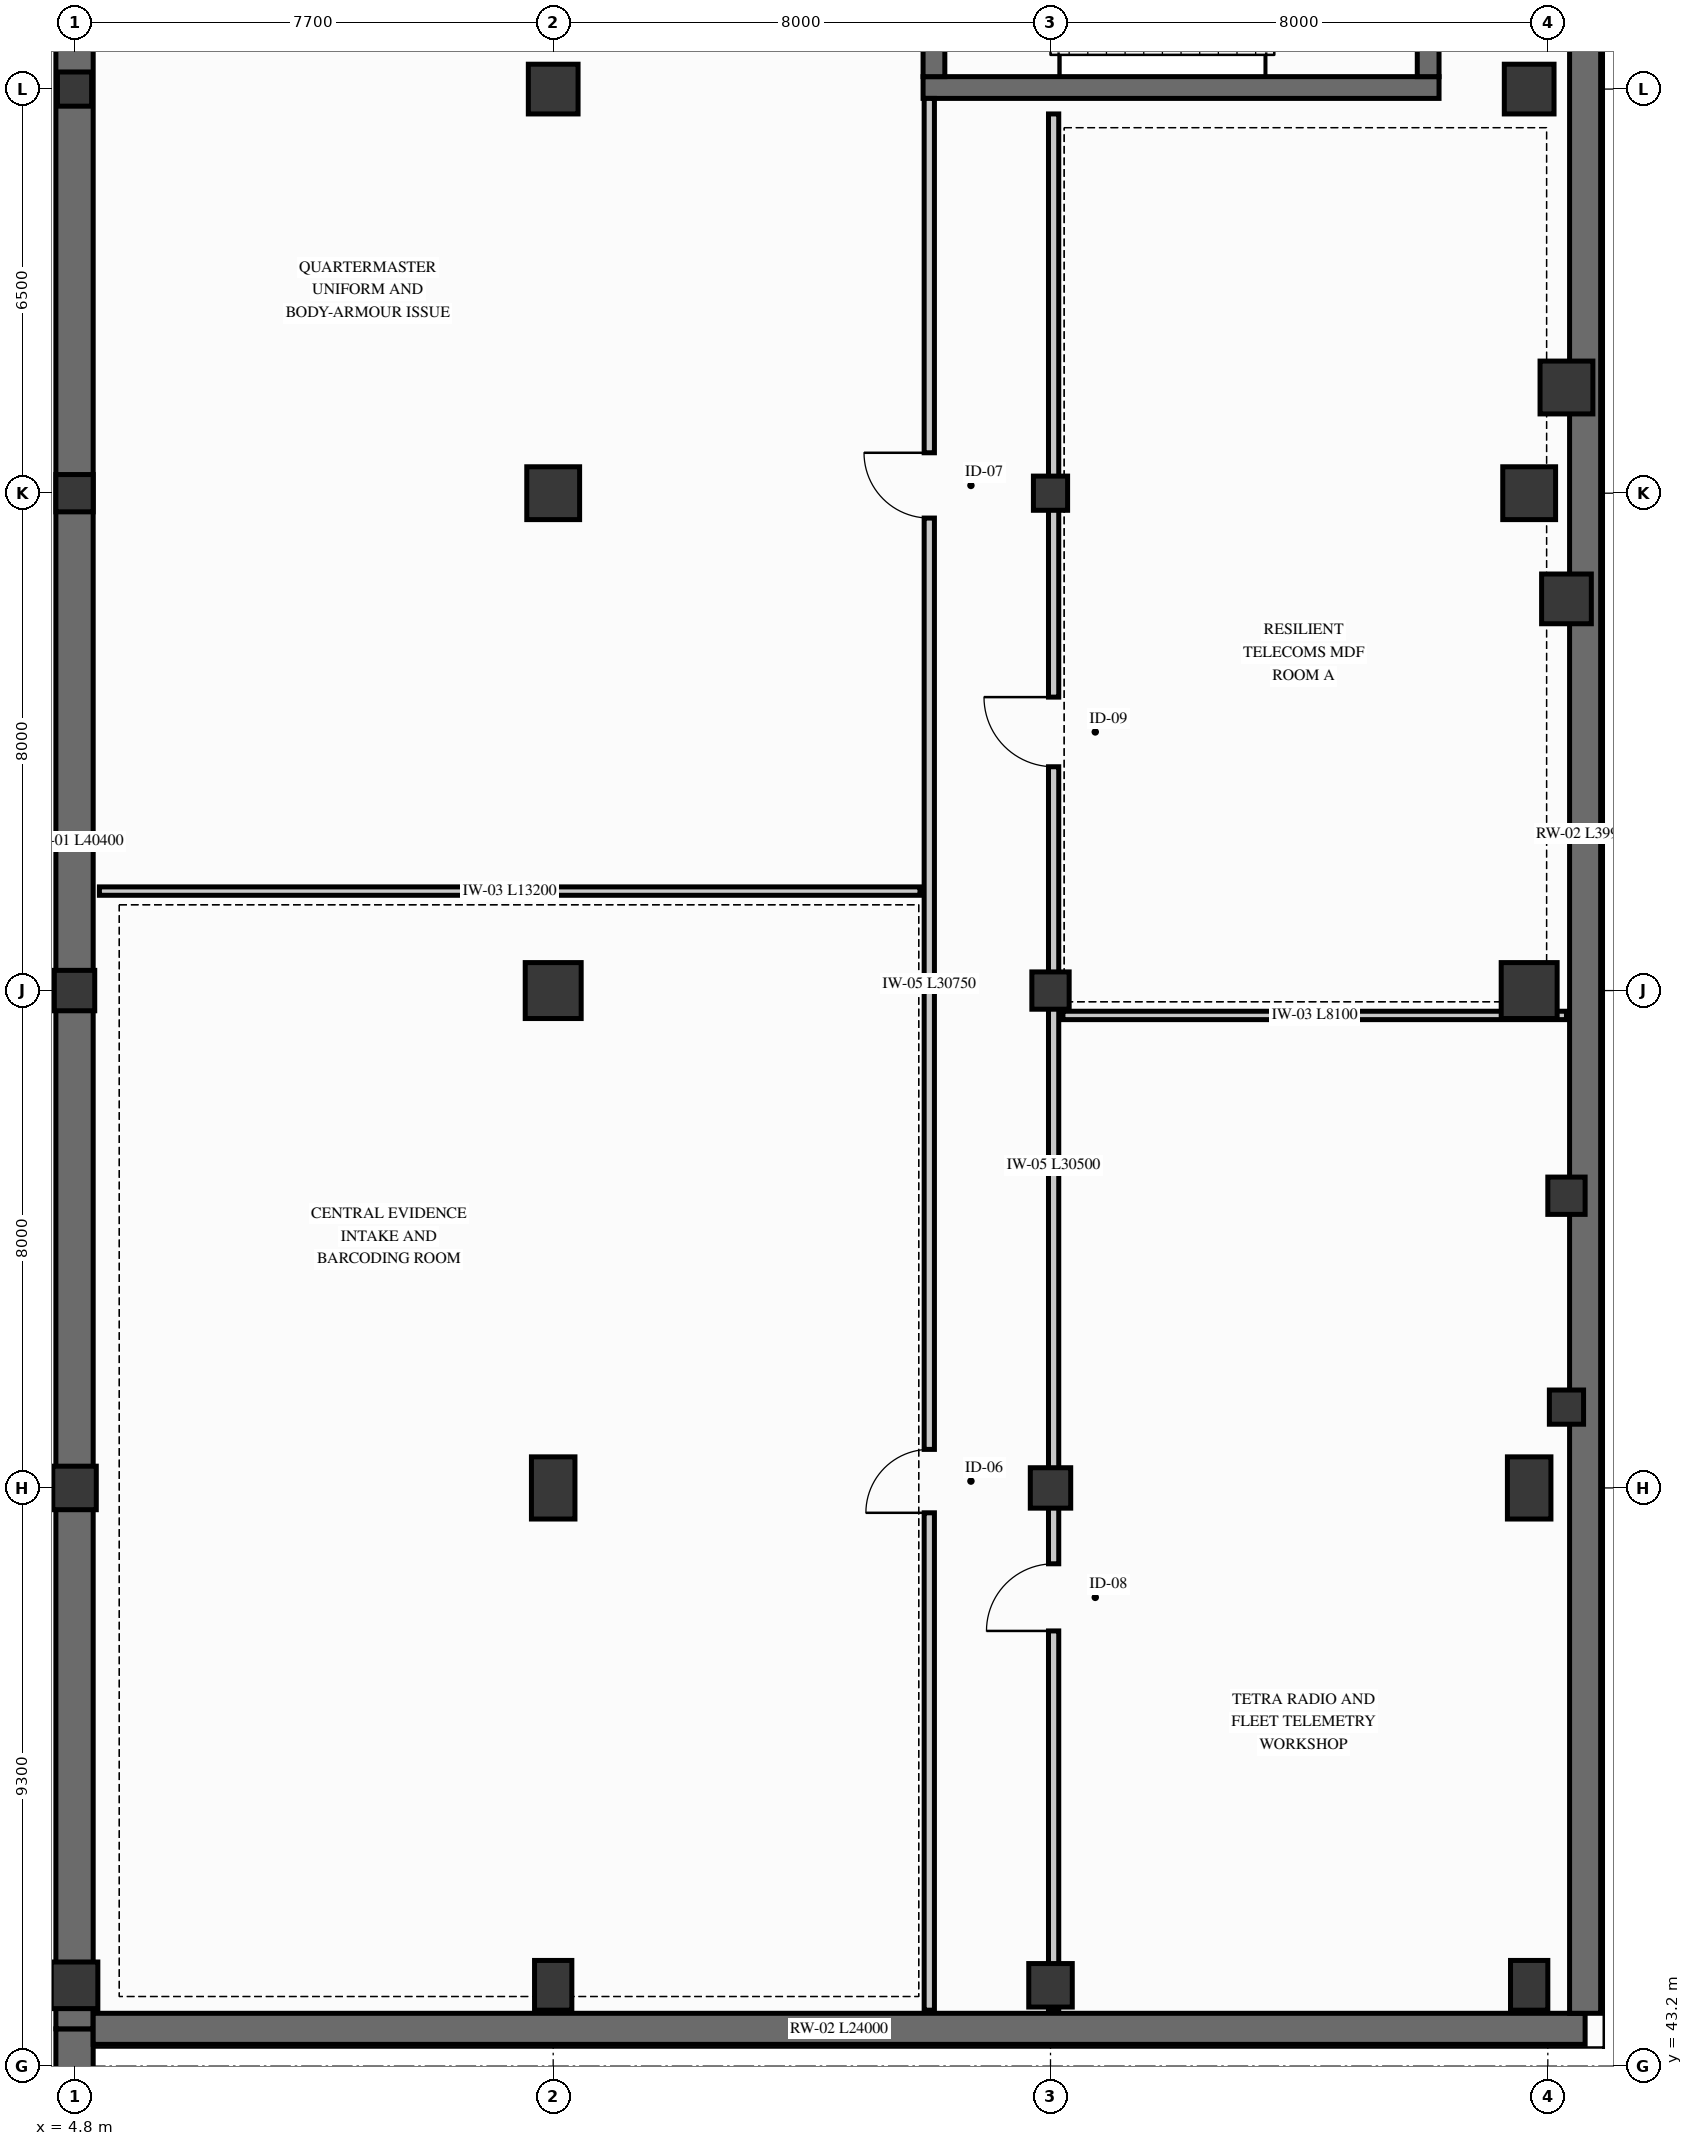
"""IFC4 building model, lengths in metres.
Left out: names, types, materials, properties, quantities, classifications, styles, units other than length and angle.
Written with IfcOpenShell. Run it as: python <this file> out.ifc"""

import sys

from ifc_helpers import new_model, si_unit, direction, frame, frame_2d, origin, origin_2d, place, context, subcontext, project, spatial, rectangle, extrude, element, fill, save


model = new_model("IFC4")
c1 = context("Model", 3, precision=1e-05, world=origin(), true_north=direction((0.0, 1.0)))
c2 = subcontext(c1, "Body", "Model", "MODEL_VIEW")
j1 = project(units=[si_unit("LENGTHUNIT", "METRE"), si_unit("PLANEANGLEUNIT", "RADIAN")], contexts=[c1])
p1 = place(None, origin())
s1 = spatial("IfcSite", under=j1, at=p1, CompositionType="ELEMENT")
p2 = place(p1, origin())
s2 = spatial("IfcBuilding", under=s1, at=p2, CompositionType="ELEMENT")
p3 = place(p2, frame((0.0, 0.0, -4.2)))
s3 = spatial("IfcBuildingStorey", under=s2, at=p3, CompositionType="ELEMENT", Elevation=-4.2)
p4 = place(p3, frame((4.8, 5.1, 0.0), z_axis=(0.0, 0.0, 1.0), x_axis=(0.0, 1.0, 0.0)))
e1 = element("IfcWall", 1, at=p4, inside=s3, PredefinedType="USERDEFINED", context=c2, shape_type="SweptSolid", body=[
    extrude(rectangle(XDim=38.7, YDim=0.6, at=frame_2d((19.35, 0.0))), origin(), (0.0, 0.0, 1.0), 3.94),
])
p5 = place(p3, frame((4.8, 43.8, 0.0), z_axis=(0.0, 0.0, 1.0), x_axis=(0.0, 1.0, 0.0)))
e2 = element("IfcWall", 2, at=p5, inside=s3, PredefinedType="USERDEFINED", context=c2, shape_type="SweptSolid", body=[
    extrude(rectangle(XDim=40.4, YDim=0.6, at=frame_2d((20.2, 0.0))), origin(), (0.0, 0.0, 1.0), 3.94),
])
p6 = place(p3, frame((5.1, 43.8, 0.0), z_axis=(0.0, 0.0, 1.0), x_axis=(1.0, 0.0, 0.0)))
e3 = element("IfcWall", 3, at=p6, inside=s3, PredefinedType="USERDEFINED", context=c2, shape_type="SweptSolid", body=[
    extrude(rectangle(XDim=24.0, YDim=0.5, at=frame_2d((12.0, 0.0))), origin(), (0.0, 0.0, 1.0), 3.94),
])
p7 = place(p3, frame((29.1, 44.05, 0.0), z_axis=(0.0, 0.0, 1.0), x_axis=(0.0, 1.0, 0.0)))
e4 = element("IfcWall", 4, at=p7, inside=s3, PredefinedType="USERDEFINED", context=c2, shape_type="SweptSolid", body=[
    extrude(rectangle(XDim=39.9, YDim=0.5, at=frame_2d((19.95, 0.0))), origin(), (0.0, 0.0, 1.0), 3.94),
])
p8 = place(p3, frame((18.45, 75.025, 0.0), z_axis=(0.0, 0.0, 1.0), x_axis=(1.0, 0.0, 0.0)))
e5 = element("IfcWall", 5, at=p8, inside=s3, PredefinedType="SHEAR", context=c2, shape_type="SweptSolid", body=[
    extrude(rectangle(XDim=8.3, YDim=0.35, at=frame_2d((4.15, 0.0))), origin(), (0.0, 0.0, 1.0), 3.9),
])
p9 = place(p3, frame((18.625, 75.2, 0.0), z_axis=(0.0, 0.0, 1.0), x_axis=(0.0, 1.0, 0.0)))
e6 = element("IfcWall", 6, at=p9, inside=s3, PredefinedType="SHEAR", context=c2, shape_type="SweptSolid", body=[
    extrude(rectangle(XDim=6.8, YDim=0.35, at=frame_2d((3.4, 0.0))), origin(), (0.0, 0.0, 1.0), 3.9),
])
p10 = place(p9, frame((2.6, 0.0, 0.0)))
e7 = element("IfcOpeningElement", 7, at=p10, cuts=e6, PredefinedType="OPENING", context=c2, shape_type="SweptSolid", body=[
    extrude(rectangle(XDim=1.25, YDim=2.2, at=frame_2d((0.625, 1.1))), frame((0.0, 0.185, 0.0), z_axis=(0.0, -1.0, 0.0), x_axis=(1.0, 0.0, 0.0)), (0.0, 0.0, 1.0), 0.37),
])
p11 = place(p3, frame((26.575, 75.2, 0.0), z_axis=(0.0, 0.0, 1.0), x_axis=(0.0, 1.0, 0.0)))
e8 = element("IfcWall", 8, at=p11, inside=s3, PredefinedType="SHEAR", context=c2, shape_type="SweptSolid", body=[
    extrude(rectangle(XDim=6.8, YDim=0.35, at=frame_2d((3.4, 0.0))), origin(), (0.0, 0.0, 1.0), 3.9),
])
p12 = place(p3, frame((28.8, 57.2, 0.0), z_axis=(0.0, 0.0, 1.0), x_axis=(1.0, 0.0, 0.0)))
e9 = element("IfcColumn", 9, at=p12, inside=s3, PredefinedType="COLUMN", context=c2, shape_type="SweptSolid", body=[
    extrude(rectangle(XDim=0.6, YDim=0.6, at=origin_2d()), origin(), (0.0, 0.0, 1.0), 4.2),
])
p13 = place(p3, frame((28.8, 53.8, 0.0), z_axis=(0.0, 0.0, 1.0), x_axis=(1.0, 0.0, 0.0)))
e10 = element("IfcColumn", 10, at=p13, inside=s3, PredefinedType="COLUMN", context=c2, shape_type="SweptSolid", body=[
    extrude(rectangle(XDim=0.55, YDim=0.55, at=origin_2d()), origin(), (0.0, 0.0, 1.0), 4.2),
])
p14 = place(p3, frame((28.8, 70.2, 0.0), z_axis=(0.0, 0.0, 1.0), x_axis=(1.0, 0.0, 0.0)))
e11 = element("IfcColumn", 11, at=p14, inside=s3, PredefinedType="COLUMN", context=c2, shape_type="SweptSolid", body=[
    extrude(rectangle(XDim=0.85, YDim=0.85, at=origin_2d()), origin(), (0.0, 0.0, 1.0), 4.2),
])
p15 = place(p3, frame((28.8, 66.8, 0.0), z_axis=(0.0, 0.0, 1.0), x_axis=(1.0, 0.0, 0.0)))
e12 = element("IfcColumn", 12, at=p15, inside=s3, PredefinedType="COLUMN", context=c2, shape_type="SweptSolid", body=[
    extrude(rectangle(XDim=0.8, YDim=0.8, at=origin_2d()), origin(), (0.0, 0.0, 1.0), 4.2),
])
p16 = place(p3, frame((4.8, 44.5, 0.0), z_axis=(0.0, 0.0, 1.0), x_axis=(1.0, 0.0, 0.0)))
e13 = element("IfcColumn", 13, at=p16, inside=s3, PredefinedType="COLUMN", context=c2, shape_type="SweptSolid", body=[
    extrude(rectangle(XDim=0.75, YDim=0.75, at=origin_2d()), origin(), (0.0, 0.0, 1.0), 4.2),
])
p17 = place(p3, frame((4.8, 52.5, 0.0), z_axis=(0.0, 0.0, 1.0), x_axis=(1.0, 0.0, 0.0)))
e14 = element("IfcColumn", 14, at=p17, inside=s3, PredefinedType="COLUMN", context=c2, shape_type="SweptSolid", body=[
    extrude(rectangle(XDim=0.7, YDim=0.7, at=origin_2d()), origin(), (0.0, 0.0, 1.0), 4.2),
])
p18 = place(p3, frame((4.8, 60.5, 0.0), z_axis=(0.0, 0.0, 1.0), x_axis=(1.0, 0.0, 0.0)))
e15 = element("IfcColumn", 15, at=p18, inside=s3, PredefinedType="COLUMN", context=c2, shape_type="SweptSolid", body=[
    extrude(rectangle(XDim=0.65, YDim=0.65, at=origin_2d()), origin(), (0.0, 0.0, 1.0), 4.2),
])
p19 = place(p3, frame((4.8, 68.5, 0.0), z_axis=(0.0, 0.0, 1.0), x_axis=(1.0, 0.0, 0.0)))
e16 = element("IfcColumn", 16, at=p19, inside=s3, PredefinedType="COLUMN", context=c2, shape_type="SweptSolid", body=[
    extrude(rectangle(XDim=0.6, YDim=0.6, at=origin_2d()), origin(), (0.0, 0.0, 1.0), 4.2),
])
p20 = place(p3, frame((4.8, 75.0, 0.0), z_axis=(0.0, 0.0, 1.0), x_axis=(1.0, 0.0, 0.0)))
e17 = element("IfcColumn", 17, at=p20, inside=s3, PredefinedType="COLUMN", context=c2, shape_type="SweptSolid", body=[
    extrude(rectangle(XDim=0.55, YDim=0.55, at=origin_2d()), origin(), (0.0, 0.0, 1.0), 4.2),
])
p21 = place(p3, frame((12.5, 44.5, 0.0), z_axis=(0.0, 0.0, 1.0), x_axis=(1.0, 0.0, 0.0)))
e18 = element("IfcColumn", 18, at=p21, inside=s3, PredefinedType="COLUMN", context=c2, shape_type="SweptSolid", body=[
    extrude(rectangle(XDim=0.6, YDim=0.8, at=origin_2d()), origin(), (0.0, 0.0, 1.0), 4.2),
])
p22 = place(p3, frame((12.5, 52.5, 0.0), z_axis=(0.0, 0.0, 1.0), x_axis=(1.0, 0.0, 0.0)))
e19 = element("IfcColumn", 19, at=p22, inside=s3, PredefinedType="COLUMN", context=c2, shape_type="SweptSolid", body=[
    extrude(rectangle(XDim=0.7, YDim=1.0, at=origin_2d()), origin(), (0.0, 0.0, 1.0), 4.2),
])
p23 = place(p3, frame((12.5, 60.5, 0.0), z_axis=(0.0, 0.0, 1.0), x_axis=(1.0, 0.0, 0.0)))
e20 = element("IfcColumn", 20, at=p23, inside=s3, PredefinedType="COLUMN", context=c2, shape_type="SweptSolid", body=[
    extrude(rectangle(XDim=0.9, YDim=0.9, at=origin_2d()), origin(), (0.0, 0.0, 1.0), 4.2),
])
p24 = place(p3, frame((12.5, 68.5, 0.0), z_axis=(0.0, 0.0, 1.0), x_axis=(1.0, 0.0, 0.0)))
e21 = element("IfcColumn", 21, at=p24, inside=s3, PredefinedType="COLUMN", context=c2, shape_type="SweptSolid", body=[
    extrude(rectangle(XDim=0.85, YDim=0.85, at=origin_2d()), origin(), (0.0, 0.0, 1.0), 4.2),
])
p25 = place(p3, frame((12.5, 75.0, 0.0), z_axis=(0.0, 0.0, 1.0), x_axis=(1.0, 0.0, 0.0)))
e22 = element("IfcColumn", 22, at=p25, inside=s3, PredefinedType="COLUMN", context=c2, shape_type="SweptSolid", body=[
    extrude(rectangle(XDim=0.8, YDim=0.8, at=origin_2d()), origin(), (0.0, 0.0, 1.0), 4.2),
])
p26 = place(p3, frame((20.5, 44.5, 0.0), z_axis=(0.0, 0.0, 1.0), x_axis=(1.0, 0.0, 0.0)))
e23 = element("IfcColumn", 23, at=p26, inside=s3, PredefinedType="COLUMN", context=c2, shape_type="SweptSolid", body=[
    extrude(rectangle(XDim=0.7, YDim=0.7, at=origin_2d()), origin(), (0.0, 0.0, 1.0), 4.2),
])
p27 = place(p3, frame((20.5, 52.5, 0.0), z_axis=(0.0, 0.0, 1.0), x_axis=(1.0, 0.0, 0.0)))
e24 = element("IfcColumn", 24, at=p27, inside=s3, PredefinedType="COLUMN", context=c2, shape_type="SweptSolid", body=[
    extrude(rectangle(XDim=0.65, YDim=0.65, at=origin_2d()), origin(), (0.0, 0.0, 1.0), 4.2),
])
p28 = place(p3, frame((20.5, 60.5, 0.0), z_axis=(0.0, 0.0, 1.0), x_axis=(1.0, 0.0, 0.0)))
e25 = element("IfcColumn", 25, at=p28, inside=s3, PredefinedType="COLUMN", context=c2, shape_type="SweptSolid", body=[
    extrude(rectangle(XDim=0.6, YDim=0.6, at=origin_2d()), origin(), (0.0, 0.0, 1.0), 4.2),
])
p29 = place(p3, frame((20.5, 68.5, 0.0), z_axis=(0.0, 0.0, 1.0), x_axis=(1.0, 0.0, 0.0)))
e26 = element("IfcColumn", 26, at=p29, inside=s3, PredefinedType="COLUMN", context=c2, shape_type="SweptSolid", body=[
    extrude(rectangle(XDim=0.55, YDim=0.55, at=origin_2d()), origin(), (0.0, 0.0, 1.0), 4.2),
])
p30 = place(p3, frame((28.2, 44.5, 0.0), z_axis=(0.0, 0.0, 1.0), x_axis=(1.0, 0.0, 0.0)))
e27 = element("IfcColumn", 27, at=p30, inside=s3, PredefinedType="COLUMN", context=c2, shape_type="SweptSolid", body=[
    extrude(rectangle(XDim=0.6, YDim=0.8, at=origin_2d()), origin(), (0.0, 0.0, 1.0), 4.2),
])
p31 = place(p3, frame((28.2, 52.5, 0.0), z_axis=(0.0, 0.0, 1.0), x_axis=(1.0, 0.0, 0.0)))
e28 = element("IfcColumn", 28, at=p31, inside=s3, PredefinedType="COLUMN", context=c2, shape_type="SweptSolid", body=[
    extrude(rectangle(XDim=0.7, YDim=1.0, at=origin_2d()), origin(), (0.0, 0.0, 1.0), 4.2),
])
p32 = place(p3, frame((28.2, 60.5, 0.0), z_axis=(0.0, 0.0, 1.0), x_axis=(1.0, 0.0, 0.0)))
e29 = element("IfcColumn", 29, at=p32, inside=s3, PredefinedType="COLUMN", context=c2, shape_type="SweptSolid", body=[
    extrude(rectangle(XDim=0.9, YDim=0.9, at=origin_2d()), origin(), (0.0, 0.0, 1.0), 4.2),
])
p33 = place(p3, frame((28.2, 68.5, 0.0), z_axis=(0.0, 0.0, 1.0), x_axis=(1.0, 0.0, 0.0)))
e30 = element("IfcColumn", 30, at=p33, inside=s3, PredefinedType="COLUMN", context=c2, shape_type="SweptSolid", body=[
    extrude(rectangle(XDim=0.85, YDim=0.85, at=origin_2d()), origin(), (0.0, 0.0, 1.0), 4.2),
])
p34 = place(p3, frame((28.2, 75.0, 0.0), z_axis=(0.0, 0.0, 1.0), x_axis=(1.0, 0.0, 0.0)))
e31 = element("IfcColumn", 31, at=p34, inside=s3, PredefinedType="COLUMN", context=c2, shape_type="SweptSolid", body=[
    extrude(rectangle(XDim=0.8, YDim=0.8, at=origin_2d()), origin(), (0.0, 0.0, 1.0), 4.2),
])
p35 = place(p3, frame((18.55, 44.1, 0.0), z_axis=(0.0, 0.0, 1.0), x_axis=(0.0, 1.0, 0.0)))
e32 = element("IfcWall", 32, at=p35, inside=s3, PredefinedType="PARTITIONING", context=c2, shape_type="SweptSolid", body=[
    extrude(rectangle(XDim=30.75, YDim=0.165, at=frame_2d((15.375, 0.0))), origin(), (0.0, 0.0, 1.0), 3.188),
])
p36 = place(p35, frame((8.0, 0.0, 0.0)))
e33 = element("IfcOpeningElement", 33, at=p36, cuts=e32, PredefinedType="OPENING", context=c2, shape_type="SweptSolid", body=[
    extrude(rectangle(XDim=1.02, YDim=2.18, at=frame_2d((0.51, 1.09))), frame((0.0, 0.093, 0.0), z_axis=(0.0, -1.0, 0.0), x_axis=(1.0, 0.0, 0.0)), (0.0, 0.0, 1.0), 0.185),
])
p37 = place(p35, frame((24.0, 0.0, 0.0)))
e34 = element("IfcOpeningElement", 34, at=p37, cuts=e32, PredefinedType="OPENING", context=c2, shape_type="SweptSolid", body=[
    extrude(rectangle(XDim=1.05, YDim=2.2, at=frame_2d((0.525, 1.1))), frame((0.0, 0.093, 0.0), z_axis=(0.0, -1.0, 0.0), x_axis=(1.0, 0.0, 0.0)), (0.0, 0.0, 1.0), 0.185),
])
p38 = place(p3, frame((20.55, 44.1, 0.0), z_axis=(0.0, 0.0, 1.0), x_axis=(0.0, 1.0, 0.0)))
e35 = element("IfcWall", 35, at=p38, inside=s3, PredefinedType="PARTITIONING", context=c2, shape_type="SweptSolid", body=[
    extrude(rectangle(XDim=30.5, YDim=0.165, at=frame_2d((15.25, 0.0))), origin(), (0.0, 0.0, 1.0), 3.14),
])
p39 = place(p38, frame((6.1, 0.0, 0.0)))
e36 = element("IfcOpeningElement", 36, at=p39, cuts=e35, PredefinedType="OPENING", context=c2, shape_type="SweptSolid", body=[
    extrude(rectangle(XDim=1.08, YDim=2.22, at=frame_2d((0.54, 1.11))), frame((0.0, 0.093, 0.0), z_axis=(0.0, -1.0, 0.0), x_axis=(1.0, 0.0, 0.0)), (0.0, 0.0, 1.0), 0.185),
])
p40 = place(p38, frame((20.0, 0.0, 0.0)))
e37 = element("IfcOpeningElement", 37, at=p40, cuts=e35, PredefinedType="OPENING", context=c2, shape_type="SweptSolid", body=[
    extrude(rectangle(XDim=1.12, YDim=2.2, at=frame_2d((0.56, 1.1))), frame((0.0, 0.093, 0.0), z_axis=(0.0, -1.0, 0.0), x_axis=(1.0, 0.0, 0.0)), (0.0, 0.0, 1.0), 0.185),
])
p41 = place(p3, frame((5.2, 62.1, 0.0), z_axis=(0.0, 0.0, 1.0), x_axis=(1.0, 0.0, 0.0)))
e38 = element("IfcWall", 38, at=p41, inside=s3, PredefinedType="PARTITIONING", context=c2, shape_type="SweptSolid", body=[
    extrude(rectangle(XDim=13.2, YDim=0.135, at=frame_2d((6.6, 0.0))), origin(), (0.0, 0.0, 1.0), 3.138),
])
p42 = place(p3, frame((20.7, 60.1, 0.0), z_axis=(0.0, 0.0, 1.0), x_axis=(1.0, 0.0, 0.0)))
e39 = element("IfcWall", 39, at=p42, inside=s3, PredefinedType="PARTITIONING", context=c2, shape_type="SweptSolid", body=[
    extrude(rectangle(XDim=8.1, YDim=0.135, at=frame_2d((4.05, 0.0))), origin(), (0.0, 0.0, 1.0), 3.138),
])
p43 = place(p36, origin())
e40 = element("IfcDoor", 40, at=p43, inside=s3, OperationType="SINGLE_SWING_LEFT", PredefinedType="DOOR", context=c2, shape_type="SweptSolid", body=[
    extrude(rectangle(XDim=1.02, YDim=2.18, at=frame_2d((0.51, 1.09))), frame((0.0, 0.025, 0.0), z_axis=(0.0, -1.0, 0.0), x_axis=(1.0, 0.0, 0.0)), (0.0, 0.0, 1.0), 0.05),
])
fill(e33, e40)
p44 = place(p37, origin())
e41 = element("IfcDoor", 41, at=p44, inside=s3, OperationType="SINGLE_SWING_RIGHT", PredefinedType="DOOR", context=c2, shape_type="SweptSolid", body=[
    extrude(rectangle(XDim=1.05, YDim=2.2, at=frame_2d((0.525, 1.1))), frame((0.0, 0.025, 0.0), z_axis=(0.0, -1.0, 0.0), x_axis=(1.0, 0.0, 0.0)), (0.0, 0.0, 1.0), 0.05),
])
fill(e34, e41)
p45 = place(p39, origin())
e42 = element("IfcDoor", 42, at=p45, inside=s3, OperationType="SINGLE_SWING_LEFT", PredefinedType="DOOR", context=c2, shape_type="SweptSolid", body=[
    extrude(rectangle(XDim=1.08, YDim=2.22, at=frame_2d((0.54, 1.11))), frame((0.0, 0.025, 0.0), z_axis=(0.0, -1.0, 0.0), x_axis=(1.0, 0.0, 0.0)), (0.0, 0.0, 1.0), 0.05),
])
fill(e36, e42)
p46 = place(p40, origin())
e43 = element("IfcDoor", 43, at=p46, inside=s3, OperationType="SINGLE_SWING_RIGHT", PredefinedType="DOOR", context=c2, shape_type="SweptSolid", body=[
    extrude(rectangle(XDim=1.12, YDim=2.2, at=frame_2d((0.56, 1.1))), frame((0.0, 0.025, 0.0), z_axis=(0.0, -1.0, 0.0), x_axis=(1.0, 0.0, 0.0)), (0.0, 0.0, 1.0), 0.05),
])
fill(e37, e43)
save(model, sys.argv[1])
